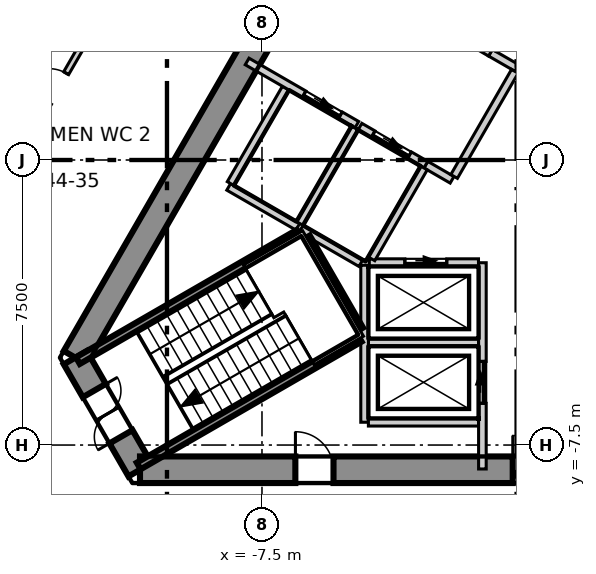
"""IFC4 building model, lengths in metres.
Left out: names, types, materials, properties, quantities, classifications, styles, units other than length and angle.
Written with IfcOpenShell. Run it as: python <this file> out.ifc"""

import sys

from ifc_helpers import new_model, si_unit, direction, frame, frame_2d, origin, place, context, subcontext, project, spatial, polyline, rectangle, outline, extrude, element, fill, save


model = new_model("IFC4")
c1 = context("Model", 3, precision=1e-05, world=origin(), true_north=direction((0.0, 1.0)))
c2 = subcontext(c1, "Body", "Model", "MODEL_VIEW")
j1 = project(units=[si_unit("LENGTHUNIT", "METRE"), si_unit("PLANEANGLEUNIT", "RADIAN")], contexts=[c1])
p1 = place(None, origin())
s1 = spatial("IfcSite", under=j1, at=p1, CompositionType="ELEMENT")
p2 = place(p1, origin())
s2 = spatial("IfcBuilding", under=s1, at=p2, CompositionType="ELEMENT")
p3 = place(p2, frame((0.0, 0.0, 191.3)))
s3 = spatial("IfcBuildingStorey", under=s2, at=p3, CompositionType="ELEMENT", Elevation=191.3)
p4 = place(p3, frame((-1.703, 13.35, -0.3), z_axis=(0.0, 0.0, 1.0), x_axis=(-0.500011533395, -0.866018744874, 0.0)))
e1 = element("IfcWall", 1, at=p4, inside=s3, PredefinedType="SHEAR", context=c2, shape_type="SweptSolid", body=[
    extrude(outline(polyline([(-0.202, -0.35), (1.782, -0.35), (3.766, -0.35), (5.75, -0.35), (7.734, -0.35), (9.718, -0.35), (11.702, -0.35), (13.686, -0.35), (15.67, -0.35), (17.654, -0.35), (19.638, -0.35), (21.622, -0.35), (21.218, 0.35), (19.307, 0.35), (17.397, 0.35), (15.486, 0.35), (13.576, 0.35), (11.665, 0.35), (9.755, 0.35), (7.844, 0.35), (5.934, 0.35), (4.023, 0.35), (2.113, 0.35), (0.202, 0.35), (-0.202, -0.35)])), origin(), (0.0, 0.0, 1.0), 4.0),
])
p5 = place(p4, frame((10.16, 0.0, 0.3)))
e2 = element("IfcOpeningElement", 2, at=p5, cuts=e1, PredefinedType="OPENING", context=c2, shape_type="SweptSolid", body=[
    extrude(rectangle(XDim=1.1, YDim=2.1, at=frame_2d((0.55, 1.05))), frame((0.0, 0.36, 0.0), z_axis=(0.0, -1.0, 0.0), x_axis=(1.0, 0.0, 0.0)), (0.0, 0.0, 1.0), 0.72),
])
p6 = place(p3, frame((-12.413, -5.2, -0.3), z_axis=(0.0, 0.0, 1.0), x_axis=(0.49999337185, -0.866029230515, 0.0)))
e3 = element("IfcWall", 3, at=p6, inside=s3, PredefinedType="SHEAR", context=c2, shape_type="SweptSolid", body=[
    extrude(outline(polyline([(-0.202, -0.35), (1.703, -0.35), (3.608, -0.35), (3.204, 0.35), (1.703, 0.35), (0.202, 0.35), (-0.202, -0.35)])), origin(), (0.0, 0.0, 1.0), 4.0),
])
p7 = place(p6, frame((1.003, 0.0, 0.3)))
e4 = element("IfcOpeningElement", 4, at=p7, cuts=e3, PredefinedType="OPENING", context=c2, shape_type="SweptSolid", body=[
    extrude(rectangle(XDim=1.4, YDim=2.1, at=frame_2d((0.7, 1.05))), frame((0.0, 0.36, 0.0), z_axis=(0.0, -1.0, 0.0), x_axis=(1.0, 0.0, 0.0)), (0.0, 0.0, 1.0), 0.72),
])
p8 = place(p3, frame((-10.71, -8.15, -0.3), z_axis=(0.0, 0.0, 1.0), x_axis=(1.0, 0.0, 0.0)))
e5 = element("IfcWall", 5, at=p8, inside=s3, PredefinedType="SHEAR", context=c2, shape_type="SweptSolid", body=[
    extrude(outline(polyline([(-0.202, -0.35), (1.782, -0.35), (3.766, -0.35), (5.75, -0.35), (7.734, -0.35), (9.718, -0.35), (11.702, -0.35), (13.686, -0.35), (15.67, -0.35), (17.654, -0.35), (19.638, -0.35), (21.622, -0.35), (21.218, 0.35), (19.307, 0.35), (17.397, 0.35), (15.486, 0.35), (13.576, 0.35), (11.665, 0.35), (9.755, 0.35), (7.844, 0.35), (5.934, 0.35), (4.023, 0.35), (2.113, 0.35), (0.202, 0.35), (-0.202, -0.35)])), origin(), (0.0, 0.0, 1.0), 4.0),
])
p9 = place(p8, frame((9.81, 0.0, 0.3)))
e6 = element("IfcOpeningElement", 6, at=p9, cuts=e5, PredefinedType="OPENING", context=c2, shape_type="SweptSolid", body=[
    extrude(rectangle(XDim=1.8, YDim=2.1, at=frame_2d((0.9, 1.05))), frame((0.0, 0.36, 0.0), z_axis=(0.0, -1.0, 0.0), x_axis=(1.0, 0.0, 0.0)), (0.0, 0.0, 1.0), 0.72),
])
p10 = place(p8, frame((4.09, 0.0, 0.3)))
e7 = element("IfcOpeningElement", 7, at=p10, cuts=e5, PredefinedType="OPENING", context=c2, shape_type="SweptSolid", body=[
    extrude(rectangle(XDim=1.0, YDim=2.1, at=frame_2d((0.5, 1.05))), frame((0.0, 0.36, 0.0), z_axis=(0.0, -1.0, 0.0), x_axis=(1.0, 0.0, 0.0)), (0.0, 0.0, 1.0), 0.72),
])
p11 = place(p3, frame((-2.869, 32.02, 0.0), z_axis=(0.0, 0.0, 1.0), x_axis=(-0.500006930241, -0.866021402571, 0.0)))
e8 = element("IfcWall", 8, at=p11, inside=s3, PredefinedType="ELEMENTEDWALL", context=c2, shape_type="SweptSolid", body=[
    extrude(rectangle(XDim=52.572, YDim=0.2, at=frame_2d((26.286, 0.0))), origin(), (0.0, 0.0, 1.0), 3.7),
])
p12 = place(p11, frame((2.327, 0.0, 0.9)))
e9 = element("IfcOpeningElement", 9, at=p12, cuts=e8, PredefinedType="OPENING", context=c2, shape_type="SweptSolid", body=[
    extrude(rectangle(XDim=4.2, YDim=2.5, at=frame_2d((2.1, 1.25))), frame((0.0, 0.11, 0.0), z_axis=(0.0, -1.0, 0.0), x_axis=(1.0, 0.0, 0.0)), (0.0, 0.0, 1.0), 0.22),
])
p13 = place(p11, frame((8.575, 0.0, 0.9)))
e10 = element("IfcOpeningElement", 10, at=p13, cuts=e8, PredefinedType="OPENING", context=c2, shape_type="SweptSolid", body=[
    extrude(rectangle(XDim=4.2, YDim=2.5, at=frame_2d((2.1, 1.25))), frame((0.0, 0.11, 0.0), z_axis=(0.0, -1.0, 0.0), x_axis=(1.0, 0.0, 0.0)), (0.0, 0.0, 1.0), 0.22),
])
p14 = place(p11, frame((14.823, 0.0, 0.9)))
e11 = element("IfcOpeningElement", 11, at=p14, cuts=e8, PredefinedType="OPENING", context=c2, shape_type="SweptSolid", body=[
    extrude(rectangle(XDim=4.2, YDim=2.5, at=frame_2d((2.1, 1.25))), frame((0.0, 0.11, 0.0), z_axis=(0.0, -1.0, 0.0), x_axis=(1.0, 0.0, 0.0)), (0.0, 0.0, 1.0), 0.22),
])
p15 = place(p11, frame((21.071, 0.0, 0.9)))
e12 = element("IfcOpeningElement", 12, at=p15, cuts=e8, PredefinedType="OPENING", context=c2, shape_type="SweptSolid", body=[
    extrude(rectangle(XDim=4.2, YDim=2.5, at=frame_2d((2.1, 1.25))), frame((0.0, 0.11, 0.0), z_axis=(0.0, -1.0, 0.0), x_axis=(1.0, 0.0, 0.0)), (0.0, 0.0, 1.0), 0.22),
])
p16 = place(p11, frame((27.319, 0.0, 0.9)))
e13 = element("IfcOpeningElement", 13, at=p16, cuts=e8, PredefinedType="OPENING", context=c2, shape_type="SweptSolid", body=[
    extrude(rectangle(XDim=4.2, YDim=2.5, at=frame_2d((2.1, 1.25))), frame((0.0, 0.11, 0.0), z_axis=(0.0, -1.0, 0.0), x_axis=(1.0, 0.0, 0.0)), (0.0, 0.0, 1.0), 0.22),
])
p17 = place(p11, frame((33.568, 0.0, 0.9)))
e14 = element("IfcOpeningElement", 14, at=p17, cuts=e8, PredefinedType="OPENING", context=c2, shape_type="SweptSolid", body=[
    extrude(rectangle(XDim=4.2, YDim=2.5, at=frame_2d((2.1, 1.25))), frame((0.0, 0.11, 0.0), z_axis=(0.0, -1.0, 0.0), x_axis=(1.0, 0.0, 0.0)), (0.0, 0.0, 1.0), 0.22),
])
p18 = place(p11, frame((39.816, 0.0, 0.9)))
e15 = element("IfcOpeningElement", 15, at=p18, cuts=e8, PredefinedType="OPENING", context=c2, shape_type="SweptSolid", body=[
    extrude(rectangle(XDim=4.2, YDim=2.5, at=frame_2d((2.1, 1.25))), frame((0.0, 0.11, 0.0), z_axis=(0.0, -1.0, 0.0), x_axis=(1.0, 0.0, 0.0)), (0.0, 0.0, 1.0), 0.22),
])
p19 = place(p11, frame((46.064, 0.0, 0.9)))
e16 = element("IfcOpeningElement", 16, at=p19, cuts=e8, PredefinedType="OPENING", context=c2, shape_type="SweptSolid", body=[
    extrude(rectangle(XDim=4.2, YDim=2.5, at=frame_2d((2.1, 1.25))), frame((0.0, 0.11, 0.0), z_axis=(0.0, -1.0, 0.0), x_axis=(1.0, 0.0, 0.0)), (0.0, 0.0, 1.0), 0.22),
])
p20 = place(p3, frame((-20.882, -11.969, 0.0), z_axis=(0.0, 0.0, 1.0), x_axis=(0.499998738735, 0.866026131975, 0.0)))
e17 = element("IfcWall", 17, at=p20, inside=s3, PredefinedType="PARTITIONING", context=c2, shape_type="SweptSolid", body=[
    extrude(rectangle(XDim=41.764, YDim=0.15, at=frame_2d((20.882, 0.0))), origin(), (0.0, 0.0, 1.0), 3.7),
])
p21 = place(p20, frame((37.014, 0.0, 0.0)))
e18 = element("IfcOpeningElement", 18, at=p21, cuts=e17, PredefinedType="OPENING", context=c2, shape_type="SweptSolid", body=[
    extrude(rectangle(XDim=1.0, YDim=2.1, at=frame_2d((0.5, 1.05))), frame((0.0, 0.085, 0.0), z_axis=(0.0, -1.0, 0.0), x_axis=(1.0, 0.0, 0.0)), (0.0, 0.0, 1.0), 0.17),
])
p22 = place(p20, frame((29.653, 0.0, 0.0)))
e19 = element("IfcOpeningElement", 19, at=p22, cuts=e17, PredefinedType="OPENING", context=c2, shape_type="SweptSolid", body=[
    extrude(rectangle(XDim=1.0, YDim=2.1, at=frame_2d((0.5, 1.05))), frame((0.0, 0.085, 0.0), z_axis=(0.0, -1.0, 0.0), x_axis=(1.0, 0.0, 0.0)), (0.0, 0.0, 1.0), 0.17),
])
p23 = place(p20, frame((23.405, 0.0, 0.0)))
e20 = element("IfcOpeningElement", 20, at=p23, cuts=e17, PredefinedType="OPENING", context=c2, shape_type="SweptSolid", body=[
    extrude(rectangle(XDim=1.0, YDim=2.1, at=frame_2d((0.5, 1.05))), frame((0.0, 0.085, 0.0), z_axis=(0.0, -1.0, 0.0), x_axis=(1.0, 0.0, 0.0)), (0.0, 0.0, 1.0), 0.17),
])
p24 = place(p20, frame((9.657, 0.0, 0.0)))
e21 = element("IfcOpeningElement", 21, at=p24, cuts=e17, PredefinedType="OPENING", context=c2, shape_type="SweptSolid", body=[
    extrude(rectangle(XDim=1.1, YDim=2.1, at=frame_2d((0.55, 1.05))), frame((0.0, 0.085, 0.0), z_axis=(0.0, -1.0, 0.0), x_axis=(1.0, 0.0, 0.0)), (0.0, 0.0, 1.0), 0.17),
])
p25 = place(p20, frame((18.757, 0.0, 0.0)))
e22 = element("IfcOpeningElement", 22, at=p25, cuts=e17, PredefinedType="OPENING", context=c2, shape_type="SweptSolid", body=[
    extrude(rectangle(XDim=0.9, YDim=2.1, at=frame_2d((0.45, 1.05))), frame((0.0, 0.085, 0.0), z_axis=(0.0, -1.0, 0.0), x_axis=(1.0, 0.0, 0.0)), (0.0, 0.0, 1.0), 0.17),
])
p26 = place(p20, frame((15.557, 0.0, 0.0)))
e23 = element("IfcOpeningElement", 23, at=p26, cuts=e17, PredefinedType="OPENING", context=c2, shape_type="SweptSolid", body=[
    extrude(rectangle(XDim=0.9, YDim=2.1, at=frame_2d((0.45, 1.05))), frame((0.0, 0.085, 0.0), z_axis=(0.0, -1.0, 0.0), x_axis=(1.0, 0.0, 0.0)), (0.0, 0.0, 1.0), 0.17),
])
p27 = place(p20, frame((12.657, 0.0, 0.0)))
e24 = element("IfcOpeningElement", 24, at=p27, cuts=e17, PredefinedType="OPENING", context=c2, shape_type="SweptSolid", body=[
    extrude(rectangle(XDim=1.0, YDim=2.1, at=frame_2d((0.5, 1.05))), frame((0.0, 0.085, 0.0), z_axis=(0.0, -1.0, 0.0), x_axis=(1.0, 0.0, 0.0)), (0.0, 0.0, 1.0), 0.17),
])
p28 = place(p20, frame((3.56, 0.0, 0.0)))
e25 = element("IfcOpeningElement", 25, at=p28, cuts=e17, PredefinedType="OPENING", context=c2, shape_type="SweptSolid", body=[
    extrude(rectangle(XDim=1.1, YDim=2.1, at=frame_2d((0.55, 1.05))), frame((0.0, 0.085, 0.0), z_axis=(0.0, -1.0, 0.0), x_axis=(1.0, 0.0, 0.0)), (0.0, 0.0, 1.0), 0.17),
])
p29 = place(p3, frame((-8.376, -0.707, 0.0), z_axis=(0.0, 0.0, 1.0), x_axis=(0.866067520717, -0.499927044236, 0.0)))
e26 = element("IfcWall", 26, at=p29, inside=s3, PredefinedType="SOLIDWALL", context=c2, shape_type="SweptSolid", body=[
    extrude(rectangle(XDim=2.1, YDim=0.2, at=frame_2d((1.05, 0.0))), origin(), (0.0, 0.0, 1.0), 3.7),
])
p30 = place(p3, frame((-8.326, -0.62, 0.0), z_axis=(0.0, 0.0, 1.0), x_axis=(0.500023687443, 0.866011727401, 0.0)))
e27 = element("IfcWall", 27, at=p30, inside=s3, PredefinedType="SOLIDWALL", context=c2, shape_type="SweptSolid", body=[
    extrude(rectangle(XDim=2.9, YDim=0.2, at=frame_2d((1.45, 0.0))), origin(), (0.0, 0.0, 1.0), 3.7),
])
p31 = place(p3, frame((-4.7, -4.8, 0.0), z_axis=(0.0, 0.0, 1.0), x_axis=(1.0, 0.0, 0.0)))
e28 = element("IfcWall", 28, at=p31, inside=s3, PredefinedType="SOLIDWALL", context=c2, shape_type="SweptSolid", body=[
    extrude(rectangle(XDim=2.9, YDim=0.2, at=frame_2d((1.45, 0.0))), origin(), (0.0, 0.0, 1.0), 3.7),
])
p32 = place(p3, frame((-4.8, -6.9, 0.0), z_axis=(0.0, 0.0, 1.0), x_axis=(0.0, 1.0, 0.0)))
e29 = element("IfcWall", 29, at=p32, inside=s3, PredefinedType="SOLIDWALL", context=c2, shape_type="SweptSolid", body=[
    extrude(rectangle(XDim=4.131, YDim=0.2, at=frame_2d((2.065, 0.0))), origin(), (0.0, 0.0, 1.0), 3.7),
])
p33 = place(p3, frame((-4.7, -6.9, 0.0), z_axis=(0.0, 0.0, 1.0), x_axis=(1.0, 0.0, 0.0)))
e30 = element("IfcWall", 30, at=p33, inside=s3, PredefinedType="SOLIDWALL", context=c2, shape_type="SweptSolid", body=[
    extrude(rectangle(XDim=2.9, YDim=0.2, at=frame_2d((1.45, 0.0))), origin(), (0.0, 0.0, 1.0), 3.7),
])
p34 = place(p3, frame((-1.7, -8.13, 0.0), z_axis=(0.0, 0.0, 1.0), x_axis=(0.0, 1.0, 0.0)))
e31 = element("IfcWall", 31, at=p34, inside=s3, PredefinedType="SOLIDWALL", context=c2, shape_type="SweptSolid", body=[
    extrude(rectangle(XDim=5.427, YDim=0.2, at=frame_2d((2.713, 0.0))), origin(), (0.0, 0.0, 1.0), 3.7),
])
p35 = place(p34, frame((1.73, 0.0, 0.0)))
e32 = element("IfcOpeningElement", 32, at=p35, cuts=e31, PredefinedType="OPENING", context=c2, shape_type="SweptSolid", body=[
    extrude(rectangle(XDim=1.1, YDim=2.1, at=frame_2d((0.55, 1.05))), frame((0.0, 0.11, 0.0), z_axis=(0.0, -1.0, 0.0), x_axis=(1.0, 0.0, 0.0)), (0.0, 0.0, 1.0), 0.22),
])
p36 = place(p3, frame((-4.676, -2.7, 0.0), z_axis=(0.0, 0.0, 1.0), x_axis=(1.0, 0.0, 0.0)))
e33 = element("IfcWall", 33, at=p36, inside=s3, PredefinedType="SOLIDWALL", context=c2, shape_type="SweptSolid", body=[
    extrude(rectangle(XDim=2.873, YDim=0.2, at=frame_2d((1.437, 0.0))), origin(), (0.0, 0.0, 1.0), 3.7),
])
p37 = place(p36, frame((0.937, 0.0, 0.0)))
e34 = element("IfcOpeningElement", 34, at=p37, cuts=e33, PredefinedType="OPENING", context=c2, shape_type="SweptSolid", body=[
    extrude(rectangle(XDim=1.1, YDim=2.1, at=frame_2d((0.55, 1.05))), frame((0.0, 0.11, 0.0), z_axis=(0.0, -1.0, 0.0), x_axis=(1.0, 0.0, 0.0)), (0.0, 0.0, 1.0), 0.22),
])
p38 = place(p3, frame((-7.891, 2.593, 0.0), z_axis=(0.0, 0.0, 1.0), x_axis=(0.866070917804, -0.499921159118, 0.0)))
e35 = element("IfcWall", 35, at=p38, inside=s3, PredefinedType="SOLIDWALL", context=c2, shape_type="SweptSolid", body=[
    extrude(rectangle(XDim=3.333, YDim=0.2, at=frame_2d((1.666, 0.0))), origin(), (0.0, 0.0, 1.0), 3.7),
])
p39 = place(p38, frame((1.73, 0.0, 0.0)))
e36 = element("IfcOpeningElement", 36, at=p39, cuts=e35, PredefinedType="OPENING", context=c2, shape_type="SweptSolid", body=[
    extrude(rectangle(XDim=1.1, YDim=2.1, at=frame_2d((0.55, 1.05))), frame((0.0, 0.11, 0.0), z_axis=(0.0, -1.0, 0.0), x_axis=(1.0, 0.0, 0.0)), (0.0, 0.0, 1.0), 0.22),
])
p40 = place(p3, frame((-3.188, -0.122, 0.0), z_axis=(0.0, 0.0, 1.0), x_axis=(0.865705793592, -0.50055317294, 0.0)))
e37 = element("IfcWall", 37, at=p40, inside=s3, PredefinedType="SOLIDWALL", context=c2, shape_type="SweptSolid", body=[
    extrude(rectangle(XDim=0.797, YDim=0.2, at=frame_2d((0.398, 0.0))), origin(), (0.0, 0.0, 1.0), 3.7),
])
p41 = place(p3, frame((-1.488, 2.822, 0.0), z_axis=(0.0, 0.0, 1.0), x_axis=(0.866236612152, -0.499633997809, 0.0)))
e38 = element("IfcWall", 38, at=p41, inside=s3, PredefinedType="SOLIDWALL", context=c2, shape_type="SweptSolid", body=[
    extrude(rectangle(XDim=0.796, YDim=0.2, at=frame_2d((0.398, 0.0))), origin(), (0.0, 0.0, 1.0), 3.7),
])
p42 = place(p3, frame((-2.444, -0.433, 0.0), z_axis=(0.0, 0.0, 1.0), x_axis=(0.500035624827, 0.866004834804, 0.0)))
e39 = element("IfcWall", 39, at=p42, inside=s3, PredefinedType="SOLIDWALL", context=c2, shape_type="SweptSolid", body=[
    extrude(rectangle(XDim=3.194, YDim=0.2, at=frame_2d((1.597, 0.0))), origin(), (0.0, 0.0, 1.0), 3.7),
])
p43 = place(p3, frame((-6.507, -1.67, 0.0), z_axis=(0.0, 0.0, 1.0), x_axis=(0.50012328804, 0.865954211699, 0.0)))
e40 = element("IfcWall", 40, at=p43, inside=s3, PredefinedType="SOLIDWALL", context=c2, shape_type="SweptSolid", body=[
    extrude(rectangle(XDim=2.9, YDim=0.2, at=frame_2d((1.45, 0.0))), origin(), (0.0, 0.0, 1.0), 3.7),
])
p44 = place(p3, frame((-6.47, -1.807, 0.0), z_axis=(0.0, 0.0, 1.0), x_axis=(0.865883195159, -0.500246231712, 0.0)))
e41 = element("IfcWall", 41, at=p44, inside=s3, PredefinedType="SOLIDWALL", context=c2, shape_type="SweptSolid", body=[
    extrude(rectangle(XDim=1.815, YDim=0.2, at=frame_2d((0.908, 0.0))), origin(), (0.0, 0.0, 1.0), 3.7),
])
p45 = place(p3, frame((-4.922, 0.879, 0.0), z_axis=(0.0, 0.0, 1.0), x_axis=(0.866073918653, -0.499915960366, 0.0)))
e42 = element("IfcWall", 42, at=p45, inside=s3, PredefinedType="SOLIDWALL", context=c2, shape_type="SweptSolid", body=[
    extrude(rectangle(XDim=2.002, YDim=0.2, at=frame_2d((1.001, 0.0))), origin(), (0.0, 0.0, 1.0), 3.7),
])
p46 = place(p45, frame((0.402, 0.0, 0.0)))
e43 = element("IfcOpeningElement", 43, at=p46, cuts=e42, PredefinedType="OPENING", context=c2, shape_type="SweptSolid", body=[
    extrude(rectangle(XDim=1.1, YDim=2.1, at=frame_2d((0.55, 1.05))), frame((0.0, 0.11, 0.0), z_axis=(0.0, -1.0, 0.0), x_axis=(1.0, 0.0, 0.0)), (0.0, 0.0, 1.0), 0.22),
])
p47 = place(p3, frame((-4.619, -2.6, 0.0), z_axis=(0.0, 0.0, 1.0), x_axis=(0.50009492287, 0.865970593103, 0.0)))
e44 = element("IfcWall", 44, at=p47, inside=s3, PredefinedType="SOLIDWALL", context=c2, shape_type="SweptSolid", body=[
    extrude(rectangle(XDim=2.761, YDim=0.2, at=frame_2d((1.381, 0.0))), origin(), (0.0, 0.0, 1.0), 3.7),
])
p48 = place(p3, frame((-3.309, 3.873, 0.0), z_axis=(0.0, 0.0, 1.0), x_axis=(0.866098583652, -0.499873227325, 0.0)))
e45 = element("IfcWall", 45, at=p48, inside=s3, PredefinedType="SOLIDWALL", context=c2, shape_type="SweptSolid", body=[
    extrude(rectangle(XDim=2.103, YDim=0.2, at=frame_2d((1.051, 0.0))), origin(), (0.0, 0.0, 1.0), 3.7),
])
p49 = place(p48, frame((0.502, 0.0, 0.0)))
e46 = element("IfcOpeningElement", 46, at=p49, cuts=e45, PredefinedType="OPENING", context=c2, shape_type="SweptSolid", body=[
    extrude(rectangle(XDim=1.1, YDim=2.1, at=frame_2d((0.55, 1.05))), frame((0.0, 0.11, 0.0), z_axis=(0.0, -1.0, 0.0), x_axis=(1.0, 0.0, 0.0)), (0.0, 0.0, 1.0), 0.22),
])
p50 = place(p3, frame((-12.344, -5.279, 0.0), z_axis=(0.0, 0.0, 1.0), x_axis=(0.866046323291, 0.499963764601, 0.0)))
e47 = element("IfcWall", 47, at=p50, inside=s3, PredefinedType="SOLIDWALL", context=c2, shape_type="SweptSolid", body=[
    extrude(rectangle(XDim=6.714, YDim=0.2, at=frame_2d((3.357, 0.0))), origin(), (0.0, 0.0, 1.0), 3.7),
])
p51 = place(p3, frame((-6.329, -2.038, 0.0), z_axis=(0.0, 0.0, 1.0), x_axis=(0.500200581029, -0.865909567298, 0.0)))
e48 = element("IfcWall", 48, at=p51, inside=s3, PredefinedType="SOLIDWALL", context=c2, shape_type="SweptSolid", body=[
    extrude(rectangle(XDim=2.799, YDim=0.2, at=frame_2d((1.399, 0.0))), origin(), (0.0, 0.0, 1.0), 3.7),
])
p52 = place(p3, frame((-10.744, -8.051, 0.0), z_axis=(0.0, 0.0, 1.0), x_axis=(0.865983344943, 0.500072840975, 0.0)))
e49 = element("IfcWall", 49, at=p52, inside=s3, PredefinedType="SOLIDWALL", context=c2, shape_type="SweptSolid", body=[
    extrude(rectangle(XDim=6.715, YDim=0.2, at=frame_2d((3.357, 0.0))), origin(), (0.0, 0.0, 1.0), 3.7),
])
p53 = place(p37, origin())
e50 = element("IfcDoor", 50, at=p53, inside=s3, OperationType="SLIDING_TO_LEFT", PredefinedType="DOOR", context=c2, shape_type="SweptSolid", body=[
    extrude(rectangle(XDim=1.1, YDim=2.1, at=frame_2d((0.55, 1.05))), frame((0.0, 0.025, 0.0), z_axis=(0.0, -1.0, 0.0), x_axis=(1.0, 0.0, 0.0)), (0.0, 0.0, 1.0), 0.05),
])
fill(e34, e50)
p54 = place(p35, origin())
e51 = element("IfcDoor", 51, at=p54, inside=s3, OperationType="SLIDING_TO_LEFT", PredefinedType="DOOR", context=c2, shape_type="SweptSolid", body=[
    extrude(rectangle(XDim=1.1, YDim=2.1, at=frame_2d((0.55, 1.05))), frame((0.0, 0.025, 0.0), z_axis=(0.0, -1.0, 0.0), x_axis=(1.0, 0.0, 0.0)), (0.0, 0.0, 1.0), 0.05),
])
fill(e32, e51)
p55 = place(p46, origin())
e52 = element("IfcDoor", 52, at=p55, inside=s3, OperationType="SLIDING_TO_LEFT", PredefinedType="DOOR", context=c2, shape_type="SweptSolid", body=[
    extrude(rectangle(XDim=1.1, YDim=2.1, at=frame_2d((0.55, 1.05))), frame((0.0, 0.025, 0.0), z_axis=(0.0, -1.0, 0.0), x_axis=(1.0, 0.0, 0.0)), (0.0, 0.0, 1.0), 0.05),
])
fill(e43, e52)
p56 = place(p39, origin())
e53 = element("IfcDoor", 53, at=p56, inside=s3, OperationType="SLIDING_TO_LEFT", PredefinedType="DOOR", context=c2, shape_type="SweptSolid", body=[
    extrude(rectangle(XDim=1.1, YDim=2.1, at=frame_2d((0.55, 1.05))), frame((0.0, 0.025, 0.0), z_axis=(0.0, -1.0, 0.0), x_axis=(1.0, 0.0, 0.0)), (0.0, 0.0, 1.0), 0.05),
])
fill(e36, e53)
p57 = place(p26, origin())
e54 = element("IfcDoor", 54, at=p57, inside=s3, OperationType="SINGLE_SWING_RIGHT", PredefinedType="DOOR", context=c2, shape_type="SweptSolid", body=[
    extrude(rectangle(XDim=0.9, YDim=2.1, at=frame_2d((0.45, 1.05))), frame((0.0, 0.025, 0.0), z_axis=(0.0, -1.0, 0.0), x_axis=(1.0, 0.0, 0.0)), (0.0, 0.0, 1.0), 0.05),
])
fill(e23, e54)
p58 = place(p9, origin())
e55 = element("IfcDoor", 55, at=p58, inside=s3, OperationType="DOUBLE_DOOR_SINGLE_SWING", PredefinedType="DOOR", context=c2, shape_type="SweptSolid", body=[
    extrude(rectangle(XDim=1.8, YDim=2.1, at=frame_2d((0.9, 1.05))), frame((0.0, 0.025, 0.0), z_axis=(0.0, -1.0, 0.0), x_axis=(1.0, 0.0, 0.0)), (0.0, 0.0, 1.0), 0.05),
])
fill(e6, e55)
p59 = place(p7, origin())
e56 = element("IfcDoor", 56, at=p59, inside=s3, OperationType="DOUBLE_DOOR_SINGLE_SWING", PredefinedType="DOOR", context=c2, shape_type="SweptSolid", body=[
    extrude(rectangle(XDim=1.4, YDim=2.1, at=frame_2d((0.7, 1.05))), frame((0.0, 0.025, 0.0), z_axis=(0.0, -1.0, 0.0), x_axis=(1.0, 0.0, 0.0)), (0.0, 0.0, 1.0), 0.05),
])
fill(e4, e56)
p60 = place(p10, origin())
e57 = element("IfcDoor", 57, at=p60, inside=s3, OperationType="SINGLE_SWING_RIGHT", PredefinedType="DOOR", context=c2, shape_type="SweptSolid", body=[
    extrude(rectangle(XDim=1.0, YDim=2.1, at=frame_2d((0.5, 1.05))), frame((0.0, 0.075, 0.0), z_axis=(0.0, -1.0, 0.0), x_axis=(1.0, 0.0, 0.0)), (0.0, 0.0, 1.0), 0.05),
])
fill(e7, e57)
save(model, sys.argv[1])
